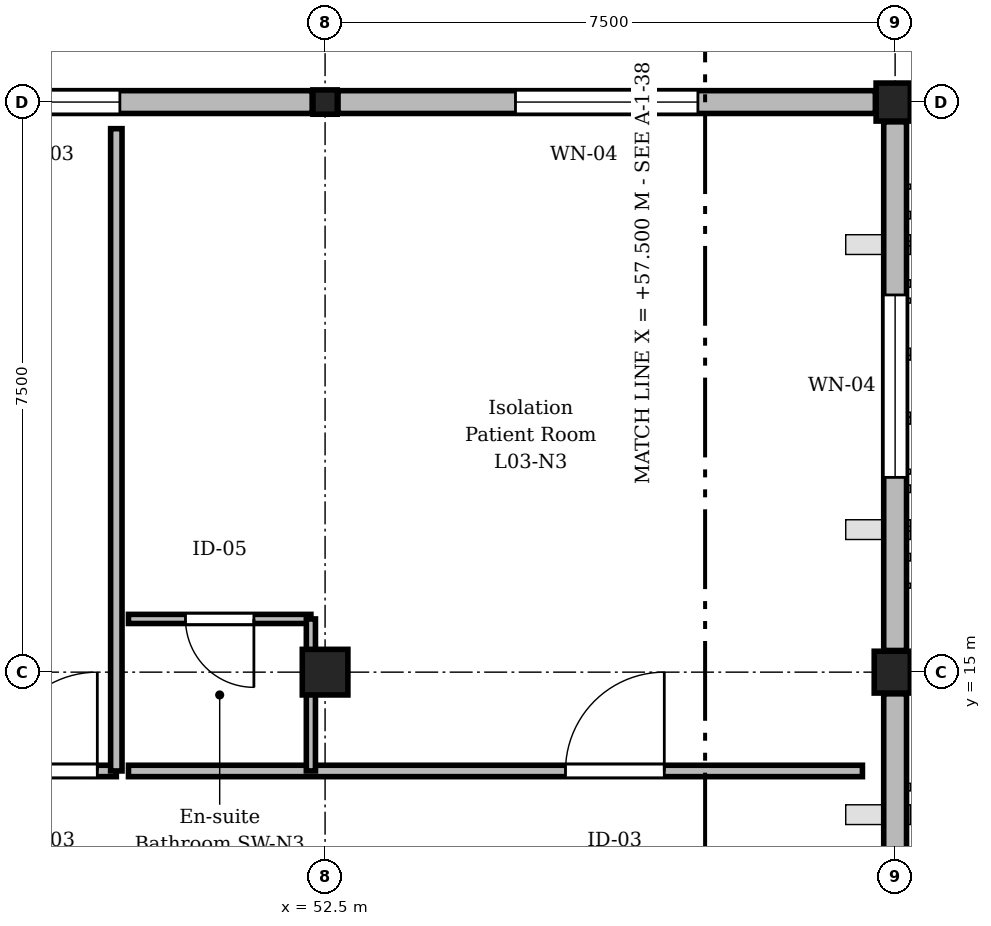
"""IFC4 building model, lengths in metres.
Left out: names, types, materials, properties, quantities, classifications, styles, units other than length and angle.
Written with IfcOpenShell. Run it as: python <this file> out.ifc"""

import sys

from ifc_helpers import new_model, si_unit, direction, frame, frame_2d, origin, origin_2d, place, context, subcontext, project, spatial, rectangle, circle, extrude, element, fill, save


model = new_model("IFC4")
c1 = context("Model", 3, precision=1e-05, world=origin(), true_north=direction((0.0, 1.0)))
c2 = subcontext(c1, "Body", "Model", "MODEL_VIEW")
j1 = project(units=[si_unit("LENGTHUNIT", "METRE"), si_unit("PLANEANGLEUNIT", "RADIAN")], contexts=[c1])
p1 = place(None, origin())
s1 = spatial("IfcSite", under=j1, at=p1, CompositionType="ELEMENT")
p2 = place(p1, origin())
s2 = spatial("IfcBuilding", under=s1, at=p2, CompositionType="ELEMENT")
p3 = place(p2, frame((0.0, 0.0, 14.1)))
s3 = spatial("IfcBuildingStorey", under=s2, at=p3, CompositionType="ELEMENT", Elevation=14.1)
p4 = place(p3, frame((52.5, 15.0, 0.0), z_axis=(0.0, 0.0, 1.0), x_axis=(1.0, 0.0, 0.0)))
e1 = element("IfcColumn", 1, at=p4, inside=s3, PredefinedType="COLUMN", context=c2, shape_type="SweptSolid", body=[
    extrude(circle(Radius=0.3, at=origin_2d()), origin(), (0.0, 0.0, 1.0), 3.75),
])
p5 = place(p3, frame((52.5, 22.5, 0.0), z_axis=(0.0, 0.0, 1.0), x_axis=(1.0, 0.0, 0.0)))
e2 = element("IfcColumn", 2, at=p5, inside=s3, PredefinedType="COLUMN", context=c2, shape_type="SweptSolid", body=[
    extrude(rectangle(XDim=0.32, YDim=0.32, at=origin_2d()), origin(), (0.0, 0.0, 1.0), 3.75),
])
p6 = place(p3, frame((60.0, 15.0, 0.0), z_axis=(0.0, 0.0, 1.0), x_axis=(1.0, 0.0, 0.0)))
e3 = element("IfcColumn", 3, at=p6, inside=s3, PredefinedType="COLUMN", context=c2, shape_type="SweptSolid", body=[
    extrude(rectangle(XDim=0.55, YDim=0.55, at=origin_2d()), origin(), (0.0, 0.0, 1.0), 3.75),
])
p7 = place(p3, frame((60.0, 22.5, 0.0), z_axis=(0.0, 0.0, 1.0), x_axis=(1.0, 0.0, 0.0)))
e4 = element("IfcColumn", 4, at=p7, inside=s3, PredefinedType="COLUMN", context=c2, shape_type="SweptSolid", body=[
    extrude(rectangle(XDim=0.5, YDim=0.5, at=origin_2d()), origin(), (0.0, 0.0, 1.0), 3.75),
])
p8 = place(p3, frame((45.17, 22.5, 0.0), z_axis=(0.0, 0.0, 1.0), x_axis=(1.0, 0.0, 0.0)))
e5 = element("IfcWall", 5, at=p8, inside=s3, PredefinedType="STANDARD", context=c2, shape_type="SweptSolid", body=[
    extrude(rectangle(XDim=7.16, YDim=0.3, at=frame_2d((3.58, 0.0))), origin(), (0.0, 0.0, 1.0), 2.87),
])
p9 = place(p8, frame((2.53, 0.0, 0.9)))
e6 = element("IfcOpeningElement", 6, at=p9, cuts=e5, PredefinedType="OPENING", context=c2, shape_type="SweptSolid", body=[
    extrude(rectangle(XDim=2.1, YDim=1.69, at=frame_2d((1.05, 0.845))), frame((0.0, 0.16, 0.0), z_axis=(0.0, -1.0, 0.0), x_axis=(1.0, 0.0, 0.0)), (0.0, 0.0, 1.0), 0.32),
])
p10 = place(p3, frame((60.0, 14.715, 0.0), z_axis=(0.0, 0.0, 1.0), x_axis=(0.0, -1.0, 0.0)))
e7 = element("IfcWall", 7, at=p10, inside=s3, PredefinedType="STANDARD", context=c2, shape_type="SweptSolid", body=[
    extrude(rectangle(XDim=6.955, YDim=0.3, at=frame_2d((3.478, 0.0))), origin(), (0.0, 0.0, 1.0), 2.87),
])
p11 = place(p10, frame((2.427, 0.0, 0.9)))
e8 = element("IfcOpeningElement", 8, at=p11, cuts=e7, PredefinedType="OPENING", context=c2, shape_type="SweptSolid", body=[
    extrude(rectangle(XDim=2.1, YDim=1.69, at=frame_2d((1.05, 0.845))), frame((0.0, 0.16, 0.0), z_axis=(0.0, -1.0, 0.0), x_axis=(1.0, 0.0, 0.0)), (0.0, 0.0, 1.0), 0.32),
])
p12 = place(p3, frame((52.67, 22.5, 0.0), z_axis=(0.0, 0.0, 1.0), x_axis=(1.0, 0.0, 0.0)))
e9 = element("IfcWall", 9, at=p12, inside=s3, PredefinedType="STANDARD", context=c2, shape_type="SweptSolid", body=[
    extrude(rectangle(XDim=7.07, YDim=0.3, at=frame_2d((3.535, 0.0))), origin(), (0.0, 0.0, 1.0), 2.87),
])
p13 = place(p12, frame((2.335, 0.0, 0.9)))
e10 = element("IfcOpeningElement", 10, at=p13, cuts=e9, PredefinedType="OPENING", context=c2, shape_type="SweptSolid", body=[
    extrude(rectangle(XDim=2.4, YDim=1.69, at=frame_2d((1.2, 0.845))), frame((0.0, 0.16, 0.0), z_axis=(0.0, -1.0, 0.0), x_axis=(1.0, 0.0, 0.0)), (0.0, 0.0, 1.0), 0.32),
])
p14 = place(p3, frame((60.0, 22.24, 0.0), z_axis=(0.0, 0.0, 1.0), x_axis=(0.0, -1.0, 0.0)))
e11 = element("IfcWall", 11, at=p14, inside=s3, PredefinedType="STANDARD", context=c2, shape_type="SweptSolid", body=[
    extrude(rectangle(XDim=6.955, YDim=0.3, at=frame_2d((3.478, 0.0))), origin(), (0.0, 0.0, 1.0), 2.87),
])
p15 = place(p14, frame((2.278, 0.0, 0.9)))
e12 = element("IfcOpeningElement", 12, at=p15, cuts=e11, PredefinedType="OPENING", context=c2, shape_type="SweptSolid", body=[
    extrude(rectangle(XDim=2.4, YDim=1.69, at=frame_2d((1.2, 0.845))), frame((0.0, 0.16, 0.0), z_axis=(0.0, -1.0, 0.0), x_axis=(1.0, 0.0, 0.0)), (0.0, 0.0, 1.0), 0.32),
])
p16 = place(p3, frame((40.097, 13.7, 0.0), z_axis=(0.0, 0.0, 1.0), x_axis=(1.0, 0.0, 0.0)))
e13 = element("IfcWall", 13, at=p16, inside=s3, PredefinedType="PARTITIONING", context=c2, shape_type="SweptSolid", body=[
    extrude(rectangle(XDim=9.657, YDim=0.15, at=frame_2d((4.828, 0.0))), origin(), (0.0, 0.0, 1.0), 3.455),
])
p17 = place(p16, frame((8.107, 0.0, 0.0)))
e14 = element("IfcOpeningElement", 14, at=p17, cuts=e13, PredefinedType="OPENING", context=c2, shape_type="SweptSolid", body=[
    extrude(rectangle(XDim=1.3, YDim=2.2, at=frame_2d((0.65, 1.1))), frame((0.0, 0.085, 0.0), z_axis=(0.0, -1.0, 0.0), x_axis=(1.0, 0.0, 0.0)), (0.0, 0.0, 1.0), 0.17),
])
p18 = place(p3, frame((49.913, 13.7, 0.0), z_axis=(0.0, 0.0, 1.0), x_axis=(1.0, 0.0, 0.0)))
e15 = element("IfcWall", 15, at=p18, inside=s3, PredefinedType="PARTITIONING", context=c2, shape_type="SweptSolid", body=[
    extrude(rectangle(XDim=9.657, YDim=0.15, at=frame_2d((4.828, 0.0))), origin(), (0.0, 0.0, 1.0), 3.455),
])
p19 = place(p18, frame((5.75, 0.0, 0.0)))
e16 = element("IfcOpeningElement", 16, at=p19, cuts=e15, PredefinedType="OPENING", context=c2, shape_type="SweptSolid", body=[
    extrude(rectangle(XDim=1.3, YDim=2.2, at=frame_2d((0.65, 1.1))), frame((0.0, 0.085, 0.0), z_axis=(0.0, -1.0, 0.0), x_axis=(1.0, 0.0, 0.0)), (0.0, 0.0, 1.0), 0.17),
])
p20 = place(p3, frame((52.313, 15.7, 0.0), z_axis=(0.0, 0.0, 1.0), x_axis=(-1.0, 0.0, 0.0)))
e17 = element("IfcWall", 17, at=p20, inside=s3, PredefinedType="PARTITIONING", context=c2, shape_type="SweptSolid", body=[
    extrude(rectangle(XDim=2.4, YDim=0.12, at=frame_2d((1.2, 0.0))), origin(), (0.0, 0.0, 1.0), 3.455),
])
p21 = place(p20, frame((0.75, 0.0, 0.0)))
e18 = element("IfcOpeningElement", 18, at=p21, cuts=e17, PredefinedType="OPENING", context=c2, shape_type="SweptSolid", body=[
    extrude(rectangle(XDim=0.9, YDim=2.1, at=frame_2d((0.45, 1.05))), frame((0.0, 0.07, 0.0), z_axis=(0.0, -1.0, 0.0), x_axis=(1.0, 0.0, 0.0)), (0.0, 0.0, 1.0), 0.14),
])
p22 = place(p3, frame((52.313, 13.7, 0.0), z_axis=(0.0, 0.0, 1.0), x_axis=(0.0, 1.0, 0.0)))
e19 = element("IfcWall", 19, at=p22, inside=s3, PredefinedType="PARTITIONING", context=c2, shape_type="SweptSolid", body=[
    extrude(rectangle(XDim=2.0, YDim=0.12, at=frame_2d((1.0, 0.0))), origin(), (0.0, 0.0, 1.0), 2.905),
])
p23 = place(p3, frame((49.753, 13.7, 0.0), z_axis=(0.0, 0.0, 1.0), x_axis=(0.0, 1.0, 0.0)))
e20 = element("IfcWall", 20, at=p23, inside=s3, PredefinedType="PARTITIONING", context=c2, shape_type="SweptSolid", body=[
    extrude(rectangle(XDim=8.45, YDim=0.15, at=frame_2d((4.225, 0.0))), origin(), (0.0, 0.0, 1.0), 3.455),
])
p24 = place(p9, origin())
e21 = element("IfcWindow", 21, at=p24, inside=s3, PartitioningType="SINGLE_PANEL", PredefinedType="WINDOW", context=c2, shape_type="SweptSolid", body=[
    extrude(rectangle(XDim=2.1, YDim=1.69, at=frame_2d((1.05, 0.845))), frame((0.0, 0.03, 0.0), z_axis=(0.0, -1.0, 0.0), x_axis=(1.0, 0.0, 0.0)), (0.0, 0.0, 1.0), 0.06),
])
fill(e6, e21)
p25 = place(p13, origin())
e22 = element("IfcWindow", 22, at=p25, inside=s3, PartitioningType="SINGLE_PANEL", PredefinedType="WINDOW", context=c2, shape_type="SweptSolid", body=[
    extrude(rectangle(XDim=2.4, YDim=1.69, at=frame_2d((1.2, 0.845))), frame((0.0, 0.03, 0.0), z_axis=(0.0, -1.0, 0.0), x_axis=(1.0, 0.0, 0.0)), (0.0, 0.0, 1.0), 0.06),
])
fill(e10, e22)
p26 = place(p15, origin())
e23 = element("IfcWindow", 23, at=p26, inside=s3, PartitioningType="SINGLE_PANEL", PredefinedType="WINDOW", context=c2, shape_type="SweptSolid", body=[
    extrude(rectangle(XDim=2.4, YDim=1.69, at=frame_2d((1.2, 0.845))), frame((0.0, 0.03, 0.0), z_axis=(0.0, -1.0, 0.0), x_axis=(1.0, 0.0, 0.0)), (0.0, 0.0, 1.0), 0.06),
])
fill(e12, e23)
p27 = place(p17, origin())
e24 = element("IfcDoor", 24, at=p27, inside=s3, OperationType="SINGLE_SWING_RIGHT", PredefinedType="DOOR", context=c2, shape_type="SweptSolid", body=[
    extrude(rectangle(XDim=1.3, YDim=2.2, at=frame_2d((0.65, 1.1))), frame((0.0, 0.025, 0.0), z_axis=(0.0, -1.0, 0.0), x_axis=(1.0, 0.0, 0.0)), (0.0, 0.0, 1.0), 0.05),
])
fill(e14, e24)
p28 = place(p19, origin())
e25 = element("IfcDoor", 25, at=p28, inside=s3, OperationType="SINGLE_SWING_RIGHT", PredefinedType="DOOR", context=c2, shape_type="SweptSolid", body=[
    extrude(rectangle(XDim=1.3, YDim=2.2, at=frame_2d((0.65, 1.1))), frame((0.0, 0.025, 0.0), z_axis=(0.0, -1.0, 0.0), x_axis=(1.0, 0.0, 0.0)), (0.0, 0.0, 1.0), 0.05),
])
fill(e16, e25)
p29 = place(p21, origin())
e26 = element("IfcDoor", 26, at=p29, inside=s3, OperationType="SINGLE_SWING_LEFT", PredefinedType="DOOR", context=c2, shape_type="SweptSolid", body=[
    extrude(rectangle(XDim=0.9, YDim=2.1, at=frame_2d((0.45, 1.05))), frame((0.0, 0.025, 0.0), z_axis=(0.0, -1.0, 0.0), x_axis=(1.0, 0.0, 0.0)), (0.0, 0.0, 1.0), 0.05),
])
fill(e18, e26)
save(model, sys.argv[1])
